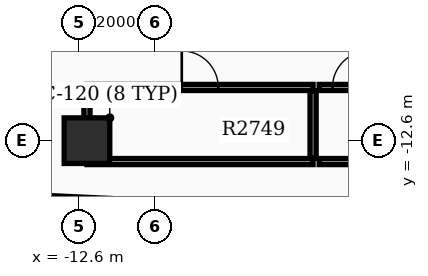
"""IFC4 building model, lengths in metres.
Left out: names, types, materials, properties, quantities, classifications, styles, units other than length and angle.
Written with IfcOpenShell. Run it as: python <this file> out.ifc"""

import sys

from ifc_helpers import new_model, si_unit, direction, frame, frame_2d, origin, origin_2d, place, context, subcontext, project, spatial, rectangle, extrude, element, fill, save


model = new_model("IFC4")
c1 = context("Model", 3, precision=1e-05, world=origin(), true_north=direction((0.0, 1.0)))
c2 = subcontext(c1, "Body", "Model", "MODEL_VIEW")
j1 = project(units=[si_unit("LENGTHUNIT", "METRE"), si_unit("PLANEANGLEUNIT", "RADIAN")], contexts=[c1])
p1 = place(None, origin())
s1 = spatial("IfcSite", under=j1, at=p1, CompositionType="ELEMENT")
p2 = place(p1, origin())
s2 = spatial("IfcBuilding", under=s1, at=p2, CompositionType="ELEMENT")
p3 = place(p2, frame((0.0, 0.0, 172.2)))
s3 = spatial("IfcBuildingStorey", under=s2, at=p3, CompositionType="ELEMENT", Elevation=172.2)
p4 = place(p3, frame((-12.4, -12.6, 0.0), z_axis=(0.0, 0.0, 1.0), x_axis=(1.0, 0.0, 0.0)))
e1 = element("IfcColumn", 1, at=p4, inside=s3, PredefinedType="COLUMN", context=c2, shape_type="SweptSolid", body=[
    extrude(rectangle(XDim=1.2, YDim=1.2, at=origin_2d()), origin(), (0.0, 0.0, 1.0), 3.9),
])
p5 = place(p3, frame((-13.843, -14.164, 0.0), z_axis=(0.0, 0.0, 1.0), x_axis=(0.998889082162, -0.047123258997, 0.0)))
e2 = element("IfcWall", 2, at=p5, inside=s3, PredefinedType="STANDARD", context=c2, shape_type="SweptSolid", body=[
    extrude(rectangle(XDim=6.3, YDim=0.28, at=frame_2d((3.15, 0.0))), origin(), (0.0, 0.0, 1.0), 2.97),
])
p6 = place(p3, frame((-12.4, -13.15, 0.0), z_axis=(0.0, 0.0, 1.0), x_axis=(1.0, 0.0, 0.0)))
e3 = element("IfcWall", 3, at=p6, inside=s3, PredefinedType="PARTITIONING", context=c2, shape_type="SweptSolid", body=[
    extrude(rectangle(XDim=5.95, YDim=0.16, at=frame_2d((2.975, 0.0))), origin(), (0.0, 0.0, 1.0), 2.96),
])
p7 = place(p3, frame((-12.4, -11.2, 0.0), z_axis=(0.0, 0.0, 1.0), x_axis=(1.0, 0.0, 0.0)))
e4 = element("IfcWall", 4, at=p7, inside=s3, PredefinedType="PARTITIONING", context=c2, shape_type="SweptSolid", body=[
    extrude(rectangle(XDim=5.95, YDim=0.16, at=frame_2d((2.975, 0.0))), origin(), (0.0, 0.0, 1.0), 2.96),
])
p8 = place(p7, frame((2.495, 0.0, 0.0)))
e5 = element("IfcOpeningElement", 5, at=p8, cuts=e4, PredefinedType="OPENING", context=c2, shape_type="SweptSolid", body=[
    extrude(rectangle(XDim=0.96, YDim=2.15, at=frame_2d((0.48, 1.075))), frame((0.0, 0.09, 0.0), z_axis=(0.0, -1.0, 0.0), x_axis=(1.0, 0.0, 0.0)), (0.0, 0.0, 1.0), 0.18),
])
for number, where, z_axis, x_axis in (
    (6, (-12.4, -13.065, 0.0), (0.0, 0.0, 1.0), (0.0, 1.0, 0.0)),
    (7, (-6.45, -13.065, 0.0), (0.0, 0.0, 1.0), (0.0, 1.0, 0.0)),
):
    element("IfcWall", number, at=place(p3, frame(where, z_axis=z_axis, x_axis=x_axis)), inside=s3, PredefinedType="PARTITIONING", context=c2, shape_type="SweptSolid", body=[
        extrude(rectangle(XDim=1.78, YDim=0.16, at=frame_2d((0.89, 0.0))), origin(), (0.0, 0.0, 1.0), 2.96),
    ])
p9 = place(p3, frame((-6.29, -13.15, 0.0), z_axis=(0.0, 0.0, 1.0), x_axis=(1.0, 0.0, 0.0)))
e8 = element("IfcWall", 8, at=p9, inside=s3, PredefinedType="PARTITIONING", context=c2, shape_type="SweptSolid", body=[
    extrude(rectangle(XDim=2.44, YDim=0.16, at=frame_2d((1.22, 0.0))), origin(), (0.0, 0.0, 1.0), 2.96),
])
p10 = place(p3, frame((-6.29, -11.2, 0.0), z_axis=(0.0, 0.0, 1.0), x_axis=(1.0, 0.0, 0.0)))
e9 = element("IfcWall", 9, at=p10, inside=s3, PredefinedType="PARTITIONING", context=c2, shape_type="SweptSolid", body=[
    extrude(rectangle(XDim=2.44, YDim=0.16, at=frame_2d((1.22, 0.0))), origin(), (0.0, 0.0, 1.0), 2.96),
])
p11 = place(p10, frame((0.35, 0.0, 0.0)))
e10 = element("IfcOpeningElement", 10, at=p11, cuts=e9, PredefinedType="OPENING", context=c2, shape_type="SweptSolid", body=[
    extrude(rectangle(XDim=0.96, YDim=2.15, at=frame_2d((0.48, 1.075))), frame((0.0, 0.09, 0.0), z_axis=(0.0, -1.0, 0.0), x_axis=(1.0, 0.0, 0.0)), (0.0, 0.0, 1.0), 0.18),
])
p12 = place(p8, origin())
e11 = element("IfcDoor", 11, at=p12, inside=s3, OperationType="SINGLE_SWING_LEFT", PredefinedType="DOOR", context=c2, shape_type="SweptSolid", body=[
    extrude(rectangle(XDim=0.96, YDim=2.15, at=frame_2d((0.48, 1.075))), frame((0.0, 0.025, 0.0), z_axis=(0.0, -1.0, 0.0), x_axis=(1.0, 0.0, 0.0)), (0.0, 0.0, 1.0), 0.05),
])
fill(e5, e11)
p13 = place(p11, origin())
e12 = element("IfcDoor", 12, at=p13, inside=s3, OperationType="SINGLE_SWING_RIGHT", PredefinedType="DOOR", context=c2, shape_type="SweptSolid", body=[
    extrude(rectangle(XDim=0.96, YDim=2.15, at=frame_2d((0.48, 1.075))), frame((0.0, 0.025, 0.0), z_axis=(0.0, -1.0, 0.0), x_axis=(1.0, 0.0, 0.0)), (0.0, 0.0, 1.0), 0.05),
])
fill(e10, e12)
save(model, sys.argv[1])
